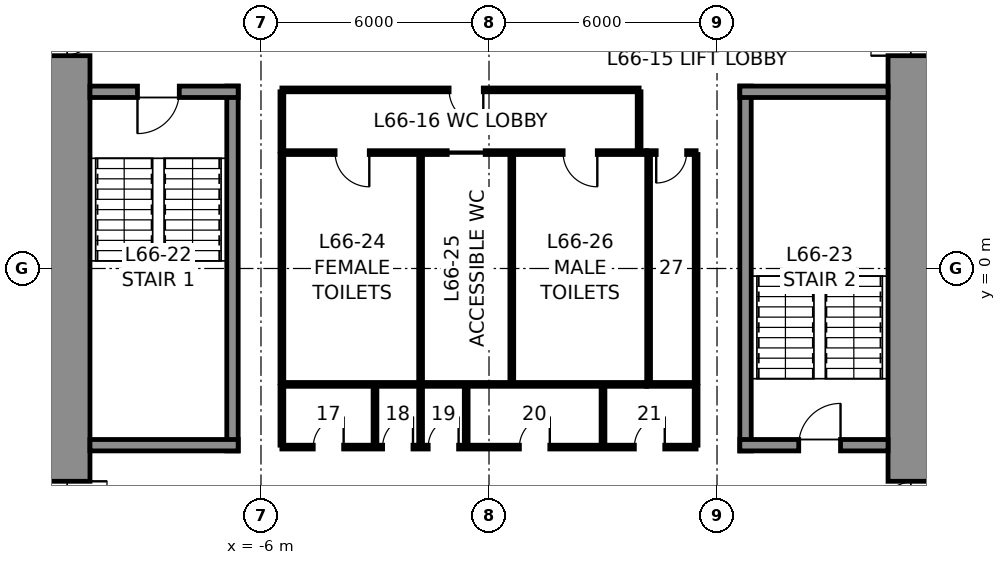
"""IFC4 building model, lengths in metres.
Left out: names, types, materials, properties, quantities, classifications, styles, units other than length and angle.
Written with IfcOpenShell. Run it as: python <this file> out.ifc"""

import sys

from ifc_helpers import new_model, si_unit, direction, frame, frame_2d, origin, place, context, subcontext, project, spatial, rectangle, extrude, element, fill, save


model = new_model("IFC4")
c1 = context("Model", 3, precision=1e-05, world=origin(), true_north=direction((0.0, 1.0)))
c2 = subcontext(c1, "Body", "Model", "MODEL_VIEW")
j1 = project(units=[si_unit("LENGTHUNIT", "METRE"), si_unit("PLANEANGLEUNIT", "RADIAN")], contexts=[c1])
p1 = place(None, origin())
s1 = spatial("IfcSite", under=j1, at=p1, CompositionType="ELEMENT")
p2 = place(p1, origin())
s2 = spatial("IfcBuilding", under=s1, at=p2, CompositionType="ELEMENT")
p3 = place(p2, frame((0.0, 0.0, 293.8)))
s3 = spatial("IfcBuildingStorey", under=s2, at=p3, CompositionType="ELEMENT", Elevation=293.8)
p4 = place(p3, frame((11.25, 10.5, 0.0), z_axis=(0.0, 0.0, 1.0), x_axis=(0.0, -1.0, 0.0)))
e1 = element("IfcWall", 1, at=p4, inside=s3, PredefinedType="SHEAR", context=c2, shape_type="SweptSolid", body=[
    extrude(rectangle(XDim=21.0, YDim=1.5, at=frame_2d((10.5, 0.0))), origin(), (0.0, 0.0, 1.0), 4.0),
])
p5 = place(p4, frame((3.7, 0.0, 0.0)))
e2 = element("IfcOpeningElement", 2, at=p5, cuts=e1, PredefinedType="OPENING", context=c2, shape_type="SweptSolid", body=[
    extrude(rectangle(XDim=1.2, YDim=2.3, at=frame_2d((0.6, 1.15))), frame((0.0, 0.76, 0.0), z_axis=(0.0, -1.0, 0.0), x_axis=(1.0, 0.0, 0.0)), (0.0, 0.0, 1.0), 1.52),
])
p6 = place(p4, frame((16.1, 0.0, 0.0)))
e3 = element("IfcOpeningElement", 3, at=p6, cuts=e1, PredefinedType="OPENING", context=c2, shape_type="SweptSolid", body=[
    extrude(rectangle(XDim=1.2, YDim=2.3, at=frame_2d((0.6, 1.15))), frame((0.0, 0.76, 0.0), z_axis=(0.0, -1.0, 0.0), x_axis=(1.0, 0.0, 0.0)), (0.0, 0.0, 1.0), 1.52),
])
p7 = place(p3, frame((-11.25, -10.5, 0.0), z_axis=(0.0, 0.0, 1.0), x_axis=(0.0, 1.0, 0.0)))
e4 = element("IfcWall", 4, at=p7, inside=s3, PredefinedType="SHEAR", context=c2, shape_type="SweptSolid", body=[
    extrude(rectangle(XDim=21.0, YDim=1.5, at=frame_2d((10.5, 0.0))), origin(), (0.0, 0.0, 1.0), 4.0),
])
p8 = place(p7, frame((16.1, 0.0, 0.0)))
e5 = element("IfcOpeningElement", 5, at=p8, cuts=e4, PredefinedType="OPENING", context=c2, shape_type="SweptSolid", body=[
    extrude(rectangle(XDim=1.2, YDim=2.3, at=frame_2d((0.6, 1.15))), frame((0.0, 0.76, 0.0), z_axis=(0.0, -1.0, 0.0), x_axis=(1.0, 0.0, 0.0)), (0.0, 0.0, 1.0), 1.52),
])
p9 = place(p7, frame((3.7, 0.0, 0.0)))
e6 = element("IfcOpeningElement", 6, at=p9, cuts=e4, PredefinedType="OPENING", context=c2, shape_type="SweptSolid", body=[
    extrude(rectangle(XDim=1.2, YDim=2.3, at=frame_2d((0.6, 1.15))), frame((0.0, 0.76, 0.0), z_axis=(0.0, -1.0, 0.0), x_axis=(1.0, 0.0, 0.0)), (0.0, 0.0, 1.0), 1.52),
])
p10 = place(p3, frame((-6.75, -4.8, 0.0), z_axis=(0.0, 0.0, 1.0), x_axis=(0.0, 1.0, 0.0)))
e7 = element("IfcWall", 7, at=p10, inside=s3, PredefinedType="SOLIDWALL", context=c2, shape_type="SweptSolid", body=[
    extrude(rectangle(XDim=9.6, YDim=0.3, at=frame_2d((4.8, 0.0))), origin(), (0.0, 0.0, 1.0), 3.75),
])
p11 = place(p3, frame((-10.5, 4.65, 0.0), z_axis=(0.0, 0.0, 1.0), x_axis=(1.0, 0.0, 0.0)))
e8 = element("IfcWall", 8, at=p11, inside=s3, PredefinedType="SOLIDWALL", context=c2, shape_type="SweptSolid", body=[
    extrude(rectangle(XDim=3.9, YDim=0.3, at=frame_2d((1.95, 0.0))), origin(), (0.0, 0.0, 1.0), 3.75),
])
p12 = place(p11, frame((1.25, 0.0, 0.0)))
e9 = element("IfcOpeningElement", 9, at=p12, cuts=e8, PredefinedType="OPENING", context=c2, shape_type="SweptSolid", body=[
    extrude(rectangle(XDim=1.1, YDim=2.3, at=frame_2d((0.55, 1.15))), frame((0.0, 0.16, 0.0), z_axis=(0.0, -1.0, 0.0), x_axis=(1.0, 0.0, 0.0)), (0.0, 0.0, 1.0), 0.32),
])
p13 = place(p3, frame((-6.6, -4.65, 0.0), z_axis=(0.0, 0.0, 1.0), x_axis=(-1.0, 0.0, 0.0)))
e10 = element("IfcWall", 10, at=p13, inside=s3, PredefinedType="SOLIDWALL", context=c2, shape_type="SweptSolid", body=[
    extrude(rectangle(XDim=3.9, YDim=0.3, at=frame_2d((1.95, 0.0))), origin(), (0.0, 0.0, 1.0), 3.75),
])
p14 = place(p3, frame((6.75, -4.8, 0.0), z_axis=(0.0, 0.0, 1.0), x_axis=(0.0, 1.0, 0.0)))
e11 = element("IfcWall", 11, at=p14, inside=s3, PredefinedType="SOLIDWALL", context=c2, shape_type="SweptSolid", body=[
    extrude(rectangle(XDim=9.6, YDim=0.3, at=frame_2d((4.8, 0.0))), origin(), (0.0, 0.0, 1.0), 3.75),
])
p15 = place(p3, frame((6.6, 4.65, 0.0), z_axis=(0.0, 0.0, 1.0), x_axis=(1.0, 0.0, 0.0)))
e12 = element("IfcWall", 12, at=p15, inside=s3, PredefinedType="SOLIDWALL", context=c2, shape_type="SweptSolid", body=[
    extrude(rectangle(XDim=3.9, YDim=0.3, at=frame_2d((1.95, 0.0))), origin(), (0.0, 0.0, 1.0), 3.75),
])
p16 = place(p3, frame((10.5, -4.65, 0.0), z_axis=(0.0, 0.0, 1.0), x_axis=(-1.0, 0.0, 0.0)))
e13 = element("IfcWall", 13, at=p16, inside=s3, PredefinedType="SOLIDWALL", context=c2, shape_type="SweptSolid", body=[
    extrude(rectangle(XDim=3.9, YDim=0.3, at=frame_2d((1.95, 0.0))), origin(), (0.0, 0.0, 1.0), 3.75),
])
p17 = place(p16, frame((1.25, 0.0, 0.0)))
e14 = element("IfcOpeningElement", 14, at=p17, cuts=e13, PredefinedType="OPENING", context=c2, shape_type="SweptSolid", body=[
    extrude(rectangle(XDim=1.1, YDim=2.3, at=frame_2d((0.55, 1.15))), frame((0.0, 0.16, 0.0), z_axis=(0.0, -1.0, 0.0), x_axis=(1.0, 0.0, 0.0)), (0.0, 0.0, 1.0), 0.32),
])
p18 = place(p3, frame((-5.45, 3.05, 0.0), z_axis=(0.0, 0.0, 1.0), x_axis=(1.0, 0.0, 0.0)))
e15 = element("IfcWall", 15, at=p18, inside=s3, PredefinedType="PARTITIONING", context=c2, shape_type="SweptSolid", body=[
    extrude(rectangle(XDim=9.6, YDim=0.1, at=frame_2d((4.8, 0.0))), origin(), (0.0, 0.0, 1.0), 3.75),
])
p19 = place(p18, frame((1.4, 0.0, 0.0)))
e16 = element("IfcOpeningElement", 16, at=p19, cuts=e15, PredefinedType="OPENING", context=c2, shape_type="SweptSolid", body=[
    extrude(rectangle(XDim=0.9, YDim=2.3, at=frame_2d((0.45, 1.15))), frame((0.0, 0.06, 0.0), z_axis=(0.0, -1.0, 0.0), x_axis=(1.0, 0.0, 0.0)), (0.0, 0.0, 1.0), 0.12),
])
p20 = place(p18, frame((4.35, 0.0, 0.0)))
e17 = element("IfcOpeningElement", 17, at=p20, cuts=e15, PredefinedType="OPENING", context=c2, shape_type="SweptSolid", body=[
    extrude(rectangle(XDim=1.0, YDim=2.3, at=frame_2d((0.5, 1.15))), frame((0.0, 0.06, 0.0), z_axis=(0.0, -1.0, 0.0), x_axis=(1.0, 0.0, 0.0)), (0.0, 0.0, 1.0), 0.12),
])
p21 = place(p18, frame((7.4, 0.0, 0.0)))
e18 = element("IfcOpeningElement", 18, at=p21, cuts=e15, PredefinedType="OPENING", context=c2, shape_type="SweptSolid", body=[
    extrude(rectangle(XDim=0.9, YDim=2.3, at=frame_2d((0.45, 1.15))), frame((0.0, 0.06, 0.0), z_axis=(0.0, -1.0, 0.0), x_axis=(1.0, 0.0, 0.0)), (0.0, 0.0, 1.0), 0.12),
])
p22 = place(p3, frame((4.15, 3.05, 0.0), z_axis=(0.0, 0.0, 1.0), x_axis=(1.0, 0.0, 0.0)))
e19 = element("IfcWall", 19, at=p22, inside=s3, PredefinedType="PARTITIONING", context=c2, shape_type="SweptSolid", body=[
    extrude(rectangle(XDim=1.3, YDim=0.1, at=frame_2d((0.65, 0.0))), origin(), (0.0, 0.0, 1.0), 3.75),
])
p23 = place(p22, frame((0.25, 0.0, 0.0)))
e20 = element("IfcOpeningElement", 20, at=p23, cuts=e19, PredefinedType="OPENING", context=c2, shape_type="SweptSolid", body=[
    extrude(rectangle(XDim=0.8, YDim=2.3, at=frame_2d((0.4, 1.15))), frame((0.0, 0.06, 0.0), z_axis=(0.0, -1.0, 0.0), x_axis=(1.0, 0.0, 0.0)), (0.0, 0.0, 1.0), 0.12),
])
p24 = place(p3, frame((4.15, -3.05, 0.0), z_axis=(0.0, 0.0, 1.0), x_axis=(-1.0, 0.0, 0.0)))
e21 = element("IfcWall", 21, at=p24, inside=s3, PredefinedType="PARTITIONING", context=c2, shape_type="SweptSolid", body=[
    extrude(rectangle(XDim=9.6, YDim=0.1, at=frame_2d((4.8, 0.0))), origin(), (0.0, 0.0, 1.0), 3.75),
])
p25 = place(p3, frame((5.45, -3.05, 0.0), z_axis=(0.0, 0.0, 1.0), x_axis=(-1.0, 0.0, 0.0)))
e22 = element("IfcWall", 22, at=p25, inside=s3, PredefinedType="PARTITIONING", context=c2, shape_type="SweptSolid", body=[
    extrude(rectangle(XDim=1.3, YDim=0.1, at=frame_2d((0.65, 0.0))), origin(), (0.0, 0.0, 1.0), 3.75),
])
for number, where, z_axis, x_axis in (
    (23, (5.45, 3.0, 0.0), (0.0, 0.0, 1.0), (0.0, -1.0, 0.0)),
    (24, (-5.45, -3.0, 0.0), (0.0, 0.0, 1.0), (0.0, 1.0, 0.0)),
    (25, (-1.8, -3.0, 0.0), (0.0, 0.0, 1.0), (0.0, 1.0, 0.0)),
    (26, (0.6, -3.0, 0.0), (0.0, 0.0, 1.0), (0.0, 1.0, 0.0)),
    (27, (4.2, -3.0, 0.0), (0.0, 0.0, 1.0), (0.0, 1.0, 0.0)),
):
    element("IfcWall", number, at=place(p3, frame(where, z_axis=z_axis, x_axis=x_axis)), inside=s3, PredefinedType="PARTITIONING", context=c2, shape_type="SweptSolid", body=[
        extrude(rectangle(XDim=6.0, YDim=0.1, at=frame_2d((3.0, 0.0))), origin(), (0.0, 0.0, 1.0), 3.75),
    ])
p26 = place(p3, frame((-5.45, 4.7, 0.0), z_axis=(0.0, 0.0, 1.0), x_axis=(1.0, 0.0, 0.0)))
e28 = element("IfcWall", 28, at=p26, inside=s3, PredefinedType="PARTITIONING", context=c2, shape_type="SweptSolid", body=[
    extrude(rectangle(XDim=9.4, YDim=0.1, at=frame_2d((4.7, 0.0))), origin(), (0.0, 0.0, 1.0), 3.75),
])
p27 = place(p26, frame((4.4, 0.0, 0.0)))
e29 = element("IfcOpeningElement", 29, at=p27, cuts=e28, PredefinedType="OPENING", context=c2, shape_type="SweptSolid", body=[
    extrude(rectangle(XDim=0.9, YDim=2.3, at=frame_2d((0.45, 1.15))), frame((0.0, 0.06, 0.0), z_axis=(0.0, -1.0, 0.0), x_axis=(1.0, 0.0, 0.0)), (0.0, 0.0, 1.0), 0.12),
])
for number, where, z_axis, x_axis in (
    (30, (-5.45, 3.1, 0.0), (0.0, 0.0, 1.0), (0.0, 1.0, 0.0)),
    (31, (3.95, 3.1, 0.0), (0.0, 0.0, 1.0), (0.0, 1.0, 0.0)),
):
    element("IfcWall", number, at=place(p3, frame(where, z_axis=z_axis, x_axis=x_axis)), inside=s3, PredefinedType="PARTITIONING", context=c2, shape_type="SweptSolid", body=[
        extrude(rectangle(XDim=1.55, YDim=0.1, at=frame_2d((0.775, 0.0))), origin(), (0.0, 0.0, 1.0), 3.75),
    ])
p28 = place(p3, frame((5.45, -4.7, 0.0), z_axis=(0.0, 0.0, 1.0), x_axis=(-1.0, 0.0, 0.0)))
e32 = element("IfcWall", 32, at=p28, inside=s3, PredefinedType="PARTITIONING", context=c2, shape_type="SweptSolid", body=[
    extrude(rectangle(XDim=10.9, YDim=0.1, at=frame_2d((5.45, 0.0))), origin(), (0.0, 0.0, 1.0), 3.75),
])
p29 = place(p28, frame((9.275, 0.0, 0.0)))
e33 = element("IfcOpeningElement", 33, at=p29, cuts=e32, PredefinedType="OPENING", context=c2, shape_type="SweptSolid", body=[
    extrude(rectangle(XDim=0.8, YDim=2.3, at=frame_2d((0.4, 1.15))), frame((0.0, 0.06, 0.0), z_axis=(0.0, -1.0, 0.0), x_axis=(1.0, 0.0, 0.0)), (0.0, 0.0, 1.0), 0.12),
])
p30 = place(p28, frame((7.45, 0.0, 0.0)))
e34 = element("IfcOpeningElement", 34, at=p30, cuts=e32, PredefinedType="OPENING", context=c2, shape_type="SweptSolid", body=[
    extrude(rectangle(XDim=0.8, YDim=2.3, at=frame_2d((0.4, 1.15))), frame((0.0, 0.06, 0.0), z_axis=(0.0, -1.0, 0.0), x_axis=(1.0, 0.0, 0.0)), (0.0, 0.0, 1.0), 0.12),
])
p31 = place(p28, frame((6.25, 0.0, 0.0)))
e35 = element("IfcOpeningElement", 35, at=p31, cuts=e32, PredefinedType="OPENING", context=c2, shape_type="SweptSolid", body=[
    extrude(rectangle(XDim=0.8, YDim=2.3, at=frame_2d((0.4, 1.15))), frame((0.0, 0.06, 0.0), z_axis=(0.0, -1.0, 0.0), x_axis=(1.0, 0.0, 0.0)), (0.0, 0.0, 1.0), 0.12),
])
p32 = place(p28, frame((3.85, 0.0, 0.0)))
e36 = element("IfcOpeningElement", 36, at=p32, cuts=e32, PredefinedType="OPENING", context=c2, shape_type="SweptSolid", body=[
    extrude(rectangle(XDim=0.8, YDim=2.3, at=frame_2d((0.4, 1.15))), frame((0.0, 0.06, 0.0), z_axis=(0.0, -1.0, 0.0), x_axis=(1.0, 0.0, 0.0)), (0.0, 0.0, 1.0), 0.12),
])
p33 = place(p28, frame((0.825, 0.0, 0.0)))
e37 = element("IfcOpeningElement", 37, at=p33, cuts=e32, PredefinedType="OPENING", context=c2, shape_type="SweptSolid", body=[
    extrude(rectangle(XDim=0.8, YDim=2.3, at=frame_2d((0.4, 1.15))), frame((0.0, 0.06, 0.0), z_axis=(0.0, -1.0, 0.0), x_axis=(1.0, 0.0, 0.0)), (0.0, 0.0, 1.0), 0.12),
])
for number, where, z_axis, x_axis in (
    (38, (-5.45, -3.1, 0.0), (0.0, 0.0, 1.0), (0.0, -1.0, 0.0)),
    (39, (5.45, -3.1, 0.0), (0.0, 0.0, 1.0), (0.0, -1.0, 0.0)),
    (40, (-3.0, -3.1, 0.0), (0.0, 0.0, 1.0), (0.0, -1.0, 0.0)),
    (41, (-1.8, -3.1, 0.0), (0.0, 0.0, 1.0), (0.0, -1.0, 0.0)),
    (42, (-0.6, -3.1, 0.0), (0.0, 0.0, 1.0), (0.0, -1.0, 0.0)),
    (43, (3.0, -3.1, 0.0), (0.0, 0.0, 1.0), (0.0, -1.0, 0.0)),
):
    element("IfcWall", number, at=place(p3, frame(where, z_axis=z_axis, x_axis=x_axis)), inside=s3, PredefinedType="PARTITIONING", context=c2, shape_type="SweptSolid", body=[
        extrude(rectangle(XDim=1.55, YDim=0.1, at=frame_2d((0.775, 0.0))), origin(), (0.0, 0.0, 1.0), 3.75),
    ])
p34 = place(p12, frame((1.1, 0.0, 0.0), z_axis=(0.0, 0.0, 1.0), x_axis=(-1.0, 0.0, 0.0)))
e44 = element("IfcDoor", 44, at=p34, inside=s3, OperationType="SINGLE_SWING_RIGHT", PredefinedType="DOOR", context=c2, shape_type="SweptSolid", body=[
    extrude(rectangle(XDim=1.1, YDim=2.3, at=frame_2d((0.55, 1.15))), frame((0.0, 0.025, 0.0), z_axis=(0.0, -1.0, 0.0), x_axis=(1.0, 0.0, 0.0)), (0.0, 0.0, 1.0), 0.05),
])
fill(e9, e44)
p35 = place(p17, frame((1.1, 0.0, 0.0), z_axis=(0.0, 0.0, 1.0), x_axis=(-1.0, 0.0, 0.0)))
e45 = element("IfcDoor", 45, at=p35, inside=s3, OperationType="SINGLE_SWING_RIGHT", PredefinedType="DOOR", context=c2, shape_type="SweptSolid", body=[
    extrude(rectangle(XDim=1.1, YDim=2.3, at=frame_2d((0.55, 1.15))), frame((0.0, 0.025, 0.0), z_axis=(0.0, -1.0, 0.0), x_axis=(1.0, 0.0, 0.0)), (0.0, 0.0, 1.0), 0.05),
])
fill(e14, e45)
p36 = place(p19, frame((0.9, 0.0, 0.0), z_axis=(0.0, 0.0, 1.0), x_axis=(-1.0, 0.0, 0.0)))
e46 = element("IfcDoor", 46, at=p36, inside=s3, OperationType="SINGLE_SWING_LEFT", PredefinedType="DOOR", context=c2, shape_type="SweptSolid", body=[
    extrude(rectangle(XDim=0.9, YDim=2.3, at=frame_2d((0.45, 1.15))), frame((0.0, 0.025, 0.0), z_axis=(0.0, -1.0, 0.0), x_axis=(1.0, 0.0, 0.0)), (0.0, 0.0, 1.0), 0.05),
])
fill(e16, e46)
p37 = place(p20, frame((1.0, 0.0, 0.0), z_axis=(0.0, 0.0, 1.0), x_axis=(-1.0, 0.0, 0.0)))
e47 = element("IfcDoor", 47, at=p37, inside=s3, OperationType="SLIDING_TO_LEFT", PredefinedType="DOOR", context=c2, shape_type="SweptSolid", body=[
    extrude(rectangle(XDim=1.0, YDim=2.3, at=frame_2d((0.5, 1.15))), frame((0.0, 0.025, 0.0), z_axis=(0.0, -1.0, 0.0), x_axis=(1.0, 0.0, 0.0)), (0.0, 0.0, 1.0), 0.05),
])
fill(e17, e47)
p38 = place(p21, frame((0.9, 0.0, 0.0), z_axis=(0.0, 0.0, 1.0), x_axis=(-1.0, 0.0, 0.0)))
e48 = element("IfcDoor", 48, at=p38, inside=s3, OperationType="SINGLE_SWING_LEFT", PredefinedType="DOOR", context=c2, shape_type="SweptSolid", body=[
    extrude(rectangle(XDim=0.9, YDim=2.3, at=frame_2d((0.45, 1.15))), frame((0.0, 0.025, 0.0), z_axis=(0.0, -1.0, 0.0), x_axis=(1.0, 0.0, 0.0)), (0.0, 0.0, 1.0), 0.05),
])
fill(e18, e48)
p39 = place(p23, frame((0.8, 0.0, 0.0), z_axis=(0.0, 0.0, 1.0), x_axis=(-1.0, 0.0, 0.0)))
e49 = element("IfcDoor", 49, at=p39, inside=s3, OperationType="SINGLE_SWING_RIGHT", PredefinedType="DOOR", context=c2, shape_type="SweptSolid", body=[
    extrude(rectangle(XDim=0.8, YDim=2.3, at=frame_2d((0.4, 1.15))), frame((0.0, 0.025, 0.0), z_axis=(0.0, -1.0, 0.0), x_axis=(1.0, 0.0, 0.0)), (0.0, 0.0, 1.0), 0.05),
])
fill(e20, e49)
p40 = place(p27, frame((0.9, 0.0, 0.0), z_axis=(0.0, 0.0, 1.0), x_axis=(-1.0, 0.0, 0.0)))
e50 = element("IfcDoor", 50, at=p40, inside=s3, OperationType="SINGLE_SWING_LEFT", PredefinedType="DOOR", context=c2, shape_type="SweptSolid", body=[
    extrude(rectangle(XDim=0.9, YDim=2.3, at=frame_2d((0.45, 1.15))), frame((0.0, 0.025, 0.0), z_axis=(0.0, -1.0, 0.0), x_axis=(1.0, 0.0, 0.0)), (0.0, 0.0, 1.0), 0.05),
])
fill(e29, e50)
p41 = place(p29, frame((0.8, 0.0, 0.0), z_axis=(0.0, 0.0, 1.0), x_axis=(-1.0, 0.0, 0.0)))
e51 = element("IfcDoor", 51, at=p41, inside=s3, OperationType="SINGLE_SWING_RIGHT", PredefinedType="DOOR", context=c2, shape_type="SweptSolid", body=[
    extrude(rectangle(XDim=0.8, YDim=2.3, at=frame_2d((0.4, 1.15))), frame((0.0, 0.025, 0.0), z_axis=(0.0, -1.0, 0.0), x_axis=(1.0, 0.0, 0.0)), (0.0, 0.0, 1.0), 0.05),
])
fill(e33, e51)
p42 = place(p30, frame((0.8, 0.0, 0.0), z_axis=(0.0, 0.0, 1.0), x_axis=(-1.0, 0.0, 0.0)))
e52 = element("IfcDoor", 52, at=p42, inside=s3, OperationType="SINGLE_SWING_RIGHT", PredefinedType="DOOR", context=c2, shape_type="SweptSolid", body=[
    extrude(rectangle(XDim=0.8, YDim=2.3, at=frame_2d((0.4, 1.15))), frame((0.0, 0.025, 0.0), z_axis=(0.0, -1.0, 0.0), x_axis=(1.0, 0.0, 0.0)), (0.0, 0.0, 1.0), 0.05),
])
fill(e34, e52)
p43 = place(p31, frame((0.8, 0.0, 0.0), z_axis=(0.0, 0.0, 1.0), x_axis=(-1.0, 0.0, 0.0)))
e53 = element("IfcDoor", 53, at=p43, inside=s3, OperationType="SINGLE_SWING_RIGHT", PredefinedType="DOOR", context=c2, shape_type="SweptSolid", body=[
    extrude(rectangle(XDim=0.8, YDim=2.3, at=frame_2d((0.4, 1.15))), frame((0.0, 0.025, 0.0), z_axis=(0.0, -1.0, 0.0), x_axis=(1.0, 0.0, 0.0)), (0.0, 0.0, 1.0), 0.05),
])
fill(e35, e53)
p44 = place(p32, frame((0.8, 0.0, 0.0), z_axis=(0.0, 0.0, 1.0), x_axis=(-1.0, 0.0, 0.0)))
e54 = element("IfcDoor", 54, at=p44, inside=s3, OperationType="SINGLE_SWING_RIGHT", PredefinedType="DOOR", context=c2, shape_type="SweptSolid", body=[
    extrude(rectangle(XDim=0.8, YDim=2.3, at=frame_2d((0.4, 1.15))), frame((0.0, 0.025, 0.0), z_axis=(0.0, -1.0, 0.0), x_axis=(1.0, 0.0, 0.0)), (0.0, 0.0, 1.0), 0.05),
])
fill(e36, e54)
p45 = place(p33, frame((0.8, 0.0, 0.0), z_axis=(0.0, 0.0, 1.0), x_axis=(-1.0, 0.0, 0.0)))
e55 = element("IfcDoor", 55, at=p45, inside=s3, OperationType="SINGLE_SWING_RIGHT", PredefinedType="DOOR", context=c2, shape_type="SweptSolid", body=[
    extrude(rectangle(XDim=0.8, YDim=2.3, at=frame_2d((0.4, 1.15))), frame((0.0, 0.025, 0.0), z_axis=(0.0, -1.0, 0.0), x_axis=(1.0, 0.0, 0.0)), (0.0, 0.0, 1.0), 0.05),
])
fill(e37, e55)
p46 = place(p8, frame((1.2, 0.0, 0.0), z_axis=(0.0, 0.0, 1.0), x_axis=(-1.0, 0.0, 0.0)))
e56 = element("IfcDoor", 56, at=p46, inside=s3, OperationType="SINGLE_SWING_LEFT", PredefinedType="DOOR", context=c2, shape_type="SweptSolid", body=[
    extrude(rectangle(XDim=1.2, YDim=2.3, at=frame_2d((0.6, 1.15))), frame((0.0, 0.025, 0.0), z_axis=(0.0, -1.0, 0.0), x_axis=(1.0, 0.0, 0.0)), (0.0, 0.0, 1.0), 0.05),
])
fill(e5, e56)
p47 = place(p9, frame((1.2, 0.0, 0.0), z_axis=(0.0, 0.0, 1.0), x_axis=(-1.0, 0.0, 0.0)))
e57 = element("IfcDoor", 57, at=p47, inside=s3, OperationType="SINGLE_SWING_LEFT", PredefinedType="DOOR", context=c2, shape_type="SweptSolid", body=[
    extrude(rectangle(XDim=1.2, YDim=2.3, at=frame_2d((0.6, 1.15))), frame((0.0, 0.025, 0.0), z_axis=(0.0, -1.0, 0.0), x_axis=(1.0, 0.0, 0.0)), (0.0, 0.0, 1.0), 0.05),
])
fill(e6, e57)
p48 = place(p5, frame((1.2, 0.0, 0.0), z_axis=(0.0, 0.0, 1.0), x_axis=(-1.0, 0.0, 0.0)))
e58 = element("IfcDoor", 58, at=p48, inside=s3, OperationType="SINGLE_SWING_LEFT", PredefinedType="DOOR", context=c2, shape_type="SweptSolid", body=[
    extrude(rectangle(XDim=1.2, YDim=2.3, at=frame_2d((0.6, 1.15))), frame((0.0, 0.025, 0.0), z_axis=(0.0, -1.0, 0.0), x_axis=(1.0, 0.0, 0.0)), (0.0, 0.0, 1.0), 0.05),
])
fill(e2, e58)
p49 = place(p6, frame((1.2, 0.0, 0.0), z_axis=(0.0, 0.0, 1.0), x_axis=(-1.0, 0.0, 0.0)))
e59 = element("IfcDoor", 59, at=p49, inside=s3, OperationType="SINGLE_SWING_LEFT", PredefinedType="DOOR", context=c2, shape_type="SweptSolid", body=[
    extrude(rectangle(XDim=1.2, YDim=2.3, at=frame_2d((0.6, 1.15))), frame((0.0, 0.025, 0.0), z_axis=(0.0, -1.0, 0.0), x_axis=(1.0, 0.0, 0.0)), (0.0, 0.0, 1.0), 0.05),
])
fill(e3, e59)
save(model, sys.argv[1])
